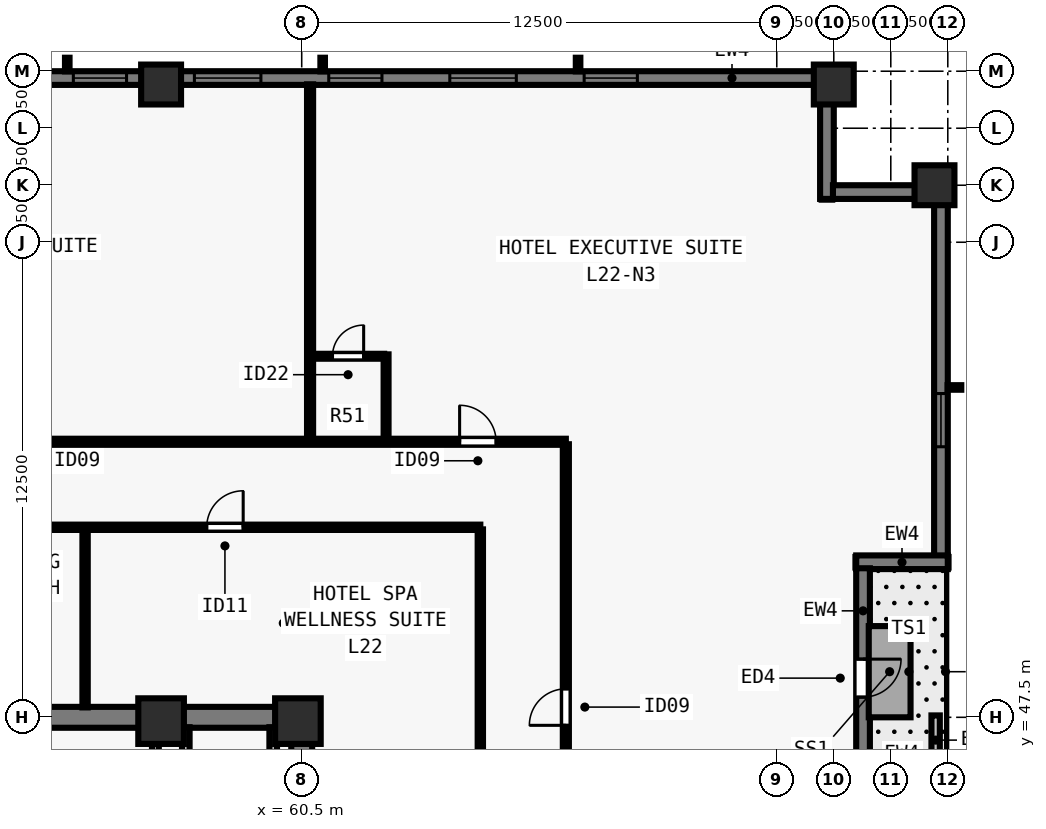
"""IFC4 building model, lengths in metres.
Left out: names, types, materials, properties, quantities, classifications, styles, units other than length and angle.
Written with IfcOpenShell. Run it as: python <this file> out.ifc"""

import sys

from ifc_helpers import new_model, si_unit, direction, frame, frame_2d, origin, origin_2d, place, context, subcontext, project, spatial, rectangle, extrude, element, fill, save


model = new_model("IFC4")
c1 = context("Model", 3, precision=1e-05, world=origin(), true_north=direction((0.0, 1.0)))
c2 = subcontext(c1, "Body", "Model", "MODEL_VIEW")
j1 = project(units=[si_unit("LENGTHUNIT", "METRE"), si_unit("PLANEANGLEUNIT", "RADIAN")], contexts=[c1])
p1 = place(None, origin())
s1 = spatial("IfcSite", under=j1, at=p1, CompositionType="ELEMENT")
p2 = place(p1, origin())
s2 = spatial("IfcBuilding", under=s1, at=p2, CompositionType="ELEMENT")
p3 = place(p2, frame((0.0, 0.0, 83.0)))
s3 = spatial("IfcBuildingStorey", under=s2, at=p3, CompositionType="ELEMENT", Elevation=83.0)
for number, where, z_axis, x_axis in (
    (1, (56.8, 47.4, 0.0), (0.0, 0.0, 1.0), (1.0, 0.0, 0.0)),
    (2, (60.4, 47.4, 0.0), (0.0, 0.0, 1.0), (1.0, 0.0, 0.0)),
):
    element("IfcColumn", number, at=place(p3, frame(where, z_axis=z_axis, x_axis=x_axis)), inside=s3, PredefinedType="COLUMN", context=c2, shape_type="SweptSolid", body=[
        extrude(rectangle(XDim=1.2, YDim=1.2, at=origin_2d()), origin(), (0.0, 0.0, 1.0), 3.5),
    ])
for number, where, z_axis, x_axis in (
    (3, (77.15, 61.5, 0.0), (0.0, 0.0, 1.0), (0.0, 1.0, 0.0)),
    (4, (74.5, 64.15, 0.0), (0.0, 0.0, 1.0), (1.0, 0.0, 0.0)),
    (5, (56.8, 64.15, 0.0), (0.0, 0.0, 1.0), (1.0, 0.0, 0.0)),
):
    element("IfcColumn", number, at=place(p3, frame(where, z_axis=z_axis, x_axis=x_axis)), inside=s3, PredefinedType="COLUMN", context=c2, shape_type="SweptSolid", body=[
        extrude(rectangle(XDim=1.05, YDim=1.05, at=origin_2d()), origin(), (0.0, 0.0, 1.0), 3.5),
    ])
p4 = place(p3, frame((29.5, 64.32, 0.0), z_axis=(0.0, 0.0, 1.0), x_axis=(1.0, 0.0, 0.0)))
e6 = element("IfcWall", 6, at=p4, inside=s3, PredefinedType="SOLIDWALL", context=c2, shape_type="SweptSolid", body=[
    extrude(rectangle(XDim=44.662, YDim=0.36, at=frame_2d((22.331, 0.0))), origin(), (0.0, 0.0, 1.0), 3.28),
])
p5 = place(p4, frame((4.83, 0.0, 0.8)))
e7 = element("IfcOpeningElement", 7, at=p5, cuts=e6, PredefinedType="OPENING", context=c2, shape_type="SweptSolid", body=[
    extrude(rectangle(XDim=1.4, YDim=1.544, at=frame_2d((0.7, 0.772))), frame((0.0, 0.19, 0.0), z_axis=(0.0, -1.0, 0.0), x_axis=(1.0, 0.0, 0.0)), (0.0, 0.0, 1.0), 0.38),
])
p6 = place(p4, frame((8.015, 0.0, 0.8)))
e8 = element("IfcOpeningElement", 8, at=p6, cuts=e6, PredefinedType="OPENING", context=c2, shape_type="SweptSolid", body=[
    extrude(rectangle(XDim=1.75, YDim=1.544, at=frame_2d((0.875, 0.772))), frame((0.0, 0.19, 0.0), z_axis=(0.0, -1.0, 0.0), x_axis=(1.0, 0.0, 0.0)), (0.0, 0.0, 1.0), 0.38),
])
p7 = place(p4, frame((11.551, 0.0, 0.8)))
e9 = element("IfcOpeningElement", 9, at=p7, cuts=e6, PredefinedType="OPENING", context=c2, shape_type="SweptSolid", body=[
    extrude(rectangle(XDim=1.4, YDim=1.544, at=frame_2d((0.7, 0.772))), frame((0.0, 0.19, 0.0), z_axis=(0.0, -1.0, 0.0), x_axis=(1.0, 0.0, 0.0)), (0.0, 0.0, 1.0), 0.38),
])
p8 = place(p4, frame((14.736, 0.0, 0.8)))
e10 = element("IfcOpeningElement", 10, at=p8, cuts=e6, PredefinedType="OPENING", context=c2, shape_type="SweptSolid", body=[
    extrude(rectangle(XDim=1.75, YDim=1.544, at=frame_2d((0.875, 0.772))), frame((0.0, 0.19, 0.0), z_axis=(0.0, -1.0, 0.0), x_axis=(1.0, 0.0, 0.0)), (0.0, 0.0, 1.0), 0.38),
])
p9 = place(p4, frame((18.721, 0.0, 0.8)))
e11 = element("IfcOpeningElement", 11, at=p9, cuts=e6, PredefinedType="OPENING", context=c2, shape_type="SweptSolid", body=[
    extrude(rectangle(XDim=1.4, YDim=1.544, at=frame_2d((0.7, 0.772))), frame((0.0, 0.19, 0.0), z_axis=(0.0, -1.0, 0.0), x_axis=(1.0, 0.0, 0.0)), (0.0, 0.0, 1.0), 0.38),
])
p10 = place(p4, frame((21.456, 0.0, 0.8)))
e12 = element("IfcOpeningElement", 12, at=p10, cuts=e6, PredefinedType="OPENING", context=c2, shape_type="SweptSolid", body=[
    extrude(rectangle(XDim=1.75, YDim=1.544, at=frame_2d((0.875, 0.772))), frame((0.0, 0.19, 0.0), z_axis=(0.0, -1.0, 0.0), x_axis=(1.0, 0.0, 0.0)), (0.0, 0.0, 1.0), 0.38),
])
p11 = place(p4, frame((24.991, 0.0, 0.8)))
e13 = element("IfcOpeningElement", 13, at=p11, cuts=e6, PredefinedType="OPENING", context=c2, shape_type="SweptSolid", body=[
    extrude(rectangle(XDim=1.4, YDim=1.544, at=frame_2d((0.7, 0.772))), frame((0.0, 0.19, 0.0), z_axis=(0.0, -1.0, 0.0), x_axis=(1.0, 0.0, 0.0)), (0.0, 0.0, 1.0), 0.38),
])
p12 = place(p4, frame((28.177, 0.0, 0.8)))
e14 = element("IfcOpeningElement", 14, at=p12, cuts=e6, PredefinedType="OPENING", context=c2, shape_type="SweptSolid", body=[
    extrude(rectangle(XDim=1.75, YDim=1.544, at=frame_2d((0.875, 0.772))), frame((0.0, 0.19, 0.0), z_axis=(0.0, -1.0, 0.0), x_axis=(1.0, 0.0, 0.0)), (0.0, 0.0, 1.0), 0.38),
])
p13 = place(p4, frame((31.711, 0.0, 0.8)))
e15 = element("IfcOpeningElement", 15, at=p13, cuts=e6, PredefinedType="OPENING", context=c2, shape_type="SweptSolid", body=[
    extrude(rectangle(XDim=1.4, YDim=1.544, at=frame_2d((0.7, 0.772))), frame((0.0, 0.19, 0.0), z_axis=(0.0, -1.0, 0.0), x_axis=(1.0, 0.0, 0.0)), (0.0, 0.0, 1.0), 0.38),
])
p14 = place(p4, frame((34.897, 0.0, 0.8)))
e16 = element("IfcOpeningElement", 16, at=p14, cuts=e6, PredefinedType="OPENING", context=c2, shape_type="SweptSolid", body=[
    extrude(rectangle(XDim=1.75, YDim=1.544, at=frame_2d((0.875, 0.772))), frame((0.0, 0.19, 0.0), z_axis=(0.0, -1.0, 0.0), x_axis=(1.0, 0.0, 0.0)), (0.0, 0.0, 1.0), 0.38),
])
p15 = place(p4, frame((38.432, 0.0, 0.8)))
e17 = element("IfcOpeningElement", 17, at=p15, cuts=e6, PredefinedType="OPENING", context=c2, shape_type="SweptSolid", body=[
    extrude(rectangle(XDim=1.4, YDim=1.544, at=frame_2d((0.7, 0.772))), frame((0.0, 0.19, 0.0), z_axis=(0.0, -1.0, 0.0), x_axis=(1.0, 0.0, 0.0)), (0.0, 0.0, 1.0), 0.38),
])
p16 = place(p3, frame((74.32, 64.5, 0.0), z_axis=(0.0, 0.0, 1.0), x_axis=(0.0, -1.0, 0.0)))
e18 = element("IfcWall", 18, at=p16, inside=s3, PredefinedType="SOLIDWALL", context=c2, shape_type="SweptSolid", body=[
    extrude(rectangle(XDim=3.36, YDim=0.36, at=frame_2d((1.68, 0.0))), origin(), (0.0, 0.0, 1.0), 3.28),
])
p17 = place(p3, frame((74.478, 61.32, 0.0), z_axis=(0.0, 0.0, 1.0), x_axis=(1.0, 0.0, 0.0)))
e19 = element("IfcWall", 19, at=p17, inside=s3, PredefinedType="SOLIDWALL", context=c2, shape_type="SweptSolid", body=[
    extrude(rectangle(XDim=2.684, YDim=0.36, at=frame_2d((1.342, 0.0))), origin(), (0.0, 0.0, 1.0), 3.28),
])
p18 = place(p3, frame((77.32, 61.5, 0.0), z_axis=(0.0, 0.0, 1.0), x_axis=(0.0, -1.0, 0.0)))
e20 = element("IfcWall", 20, at=p18, inside=s3, PredefinedType="SOLIDWALL", context=c2, shape_type="SweptSolid", body=[
    extrude(rectangle(XDim=9.762, YDim=0.36, at=frame_2d((4.881, 0.0))), origin(), (0.0, 0.0, 1.0), 3.28),
])
p19 = place(p18, frame((5.481, 0.0, 0.8)))
e21 = element("IfcOpeningElement", 21, at=p19, cuts=e20, PredefinedType="OPENING", context=c2, shape_type="SweptSolid", body=[
    extrude(rectangle(XDim=1.4, YDim=1.544, at=frame_2d((0.7, 0.772))), frame((0.0, 0.19, 0.0), z_axis=(0.0, -1.0, 0.0), x_axis=(1.0, 0.0, 0.0)), (0.0, 0.0, 1.0), 0.38),
])
p20 = place(p3, frame((77.5, 51.58, 0.0), z_axis=(0.0, 0.0, 1.0), x_axis=(-1.0, 0.0, 0.0)))
e22 = element("IfcWall", 22, at=p20, inside=s3, PredefinedType="SOLIDWALL", context=c2, shape_type="SweptSolid", body=[
    extrude(rectangle(XDim=2.41, YDim=0.36, at=frame_2d((1.205, 0.0))), origin(), (0.0, 0.0, 1.0), 3.28),
])
p21 = place(p3, frame((75.27, 51.422, 0.0), z_axis=(0.0, 0.0, 1.0), x_axis=(0.0, -1.0, 0.0)))
e23 = element("IfcWall", 23, at=p21, inside=s3, PredefinedType="SOLIDWALL", context=c2, shape_type="SweptSolid", body=[
    extrude(rectangle(XDim=5.782, YDim=0.36, at=frame_2d((2.891, 0.0))), origin(), (0.0, 0.0, 1.0), 3.28),
])
p22 = place(p21, frame((2.391, 0.0, 0.0)))
e24 = element("IfcOpeningElement", 24, at=p22, cuts=e23, PredefinedType="OPENING", context=c2, shape_type="SweptSolid", body=[
    extrude(rectangle(XDim=1.0, YDim=2.15, at=frame_2d((0.5, 1.075))), frame((0.0, 0.19, 0.0), z_axis=(0.0, -1.0, 0.0), x_axis=(1.0, 0.0, 0.0)), (0.0, 0.0, 1.0), 0.38),
])
p23 = place(p3, frame((77.18, 46.25, 0.0), z_axis=(0.0, 0.0, 1.0), x_axis=(0.0, 1.0, 0.0)))
e25 = element("IfcWall", 25, at=p23, inside=s3, PredefinedType="PARAPET", context=c2, shape_type="SweptSolid", body=[
    extrude(rectangle(XDim=1.3, YDim=0.22, at=frame_2d((0.65, 0.0))), origin(), (0.0, 0.0, 1.0), 0.55),
])
p24 = place(p3, frame((43.225, 47.5, 0.0), z_axis=(0.0, 0.0, 1.0), x_axis=(1.0, 0.0, 0.0)))
e26 = element("IfcWall", 26, at=p24, inside=s3, PredefinedType="SHEAR", context=c2, shape_type="SweptSolid", body=[
    extrude(rectangle(XDim=17.55, YDim=0.55, at=frame_2d((8.775, 0.0))), origin(), (0.0, 0.0, 1.0), 3.28),
])
p25 = place(p3, frame((60.5, 40.8, 0.0), z_axis=(0.0, 0.0, 1.0), x_axis=(0.0, 1.0, 0.0)))
e27 = element("IfcWall", 27, at=p25, inside=s3, PredefinedType="SHEAR", context=c2, shape_type="SweptSolid", body=[
    extrude(rectangle(XDim=6.435, YDim=0.55, at=frame_2d((3.218, 0.0))), origin(), (0.0, 0.0, 1.0), 3.28),
])
for number, where, z_axis, x_axis in (
    (28, (57.45, 43.735, 0.0), (0.0, 0.0, 1.0), (0.0, 1.0, 0.0)),
    (29, (59.75, 43.735, 0.0), (0.0, 0.0, 1.0), (0.0, 1.0, 0.0)),
):
    element("IfcWall", number, at=place(p3, frame(where, z_axis=z_axis, x_axis=x_axis)), inside=s3, PredefinedType="SOLIDWALL", context=c2, shape_type="SweptSolid", body=[
        extrude(rectangle(XDim=3.505, YDim=0.2, at=frame_2d((1.752, 0.0))), origin(), (0.0, 0.0, 1.0), 3.28),
    ])
p26 = place(p3, frame((56.65, 43.735, 0.0), z_axis=(0.0, 0.0, 1.0), x_axis=(0.0, 1.0, 0.0)))
e30 = element("IfcWall", 30, at=p26, inside=s3, PredefinedType="SOLIDWALL", context=c2, shape_type="SweptSolid", body=[
    extrude(rectangle(XDim=3.505, YDim=0.18, at=frame_2d((1.752, 0.0))), origin(), (0.0, 0.0, 1.0), 3.28),
])
p27 = place(p3, frame((36.55, 54.75, 0.0), z_axis=(0.0, 0.0, 1.0), x_axis=(1.0, 0.0, 0.0)))
e31 = element("IfcWall", 31, at=p27, inside=s3, PredefinedType="PARTITIONING", context=c2, shape_type="SweptSolid", body=[
    extrude(rectangle(XDim=30.9, YDim=0.16, at=frame_2d((15.45, 0.0))), origin(), (0.0, 0.0, 1.0), 3.28),
])
p28 = place(p27, frame((2.83, 0.0, 0.0)))
e32 = element("IfcOpeningElement", 32, at=p28, cuts=e31, PredefinedType="OPENING", context=c2, shape_type="SweptSolid", body=[
    extrude(rectangle(XDim=0.96, YDim=2.15, at=frame_2d((0.48, 1.075))), frame((0.0, 0.09, 0.0), z_axis=(0.0, -1.0, 0.0), x_axis=(1.0, 0.0, 0.0)), (0.0, 0.0, 1.0), 0.18),
])
p29 = place(p27, frame((15.965, 0.0, 0.0)))
e33 = element("IfcOpeningElement", 33, at=p29, cuts=e31, PredefinedType="OPENING", context=c2, shape_type="SweptSolid", body=[
    extrude(rectangle(XDim=0.96, YDim=2.15, at=frame_2d((0.48, 1.075))), frame((0.0, 0.09, 0.0), z_axis=(0.0, -1.0, 0.0), x_axis=(1.0, 0.0, 0.0)), (0.0, 0.0, 1.0), 0.18),
])
p30 = place(p27, frame((28.105, 0.0, 0.0)))
e34 = element("IfcOpeningElement", 34, at=p30, cuts=e31, PredefinedType="OPENING", context=c2, shape_type="SweptSolid", body=[
    extrude(rectangle(XDim=0.96, YDim=2.15, at=frame_2d((0.48, 1.075))), frame((0.0, 0.09, 0.0), z_axis=(0.0, -1.0, 0.0), x_axis=(1.0, 0.0, 0.0)), (0.0, 0.0, 1.0), 0.18),
])
p31 = place(p3, frame((67.45, 23.315, 0.0), z_axis=(0.0, 0.0, 1.0), x_axis=(0.0, 1.0, 0.0)))
e35 = element("IfcWall", 35, at=p31, inside=s3, PredefinedType="PARTITIONING", context=c2, shape_type="SweptSolid", body=[
    extrude(rectangle(XDim=31.37, YDim=0.16, at=frame_2d((15.685, 0.0))), origin(), (0.0, 0.0, 1.0), 3.28),
])
p32 = place(p31, frame((8.474, 0.0, 0.0)))
e36 = element("IfcOpeningElement", 36, at=p32, cuts=e35, PredefinedType="OPENING", context=c2, shape_type="SweptSolid", body=[
    extrude(rectangle(XDim=0.96, YDim=2.15, at=frame_2d((0.48, 1.075))), frame((0.0, 0.09, 0.0), z_axis=(0.0, -1.0, 0.0), x_axis=(1.0, 0.0, 0.0)), (0.0, 0.0, 1.0), 0.18),
])
p33 = place(p31, frame((23.974, 0.0, 0.0)))
e37 = element("IfcOpeningElement", 37, at=p33, cuts=e35, PredefinedType="OPENING", context=c2, shape_type="SweptSolid", body=[
    extrude(rectangle(XDim=0.96, YDim=2.15, at=frame_2d((0.48, 1.075))), frame((0.0, 0.09, 0.0), z_axis=(0.0, -1.0, 0.0), x_axis=(1.0, 0.0, 0.0)), (0.0, 0.0, 1.0), 0.18),
])
p34 = place(p3, frame((38.8, 52.5, 0.0), z_axis=(0.0, 0.0, 1.0), x_axis=(1.0, 0.0, 0.0)))
e38 = element("IfcWall", 38, at=p34, inside=s3, PredefinedType="PARTITIONING", context=c2, shape_type="SweptSolid", body=[
    extrude(rectangle(XDim=26.4, YDim=0.14, at=frame_2d((13.2, 0.0))), origin(), (0.0, 0.0, 1.0), 3.28),
])
p35 = place(p34, frame((3.2, 0.0, 0.0)))
e39 = element("IfcOpeningElement", 39, at=p35, cuts=e38, PredefinedType="OPENING", context=c2, shape_type="SweptSolid", body=[
    extrude(rectangle(XDim=0.96, YDim=2.12, at=frame_2d((0.48, 1.06))), frame((0.0, 0.08, 0.0), z_axis=(0.0, -1.0, 0.0), x_axis=(1.0, 0.0, 0.0)), (0.0, 0.0, 1.0), 0.16),
])
p36 = place(p34, frame((19.2, 0.0, 0.0)))
e40 = element("IfcOpeningElement", 40, at=p36, cuts=e38, PredefinedType="OPENING", context=c2, shape_type="SweptSolid", body=[
    extrude(rectangle(XDim=0.96, YDim=2.12, at=frame_2d((0.48, 1.06))), frame((0.0, 0.08, 0.0), z_axis=(0.0, -1.0, 0.0), x_axis=(1.0, 0.0, 0.0)), (0.0, 0.0, 1.0), 0.16),
])
p37 = place(p3, frame((65.2, 40.8, 0.0), z_axis=(0.0, 0.0, 1.0), x_axis=(0.0, 1.0, 0.0)))
e41 = element("IfcWall", 41, at=p37, inside=s3, PredefinedType="PARTITIONING", context=c2, shape_type="SweptSolid", body=[
    extrude(rectangle(XDim=11.645, YDim=0.14, at=frame_2d((5.823, 0.0))), origin(), (0.0, 0.0, 1.0), 3.28),
])
p38 = place(p37, frame((2.5, 0.0, 0.0)))
e42 = element("IfcOpeningElement", 42, at=p38, cuts=e41, PredefinedType="OPENING", context=c2, shape_type="SweptSolid", body=[
    extrude(rectangle(XDim=0.88, YDim=2.1, at=frame_2d((0.44, 1.05))), frame((0.0, 0.08, 0.0), z_axis=(0.0, -1.0, 0.0), x_axis=(1.0, 0.0, 0.0)), (0.0, 0.0, 1.0), 0.16),
])
p39 = place(p3, frame((54.8, 47.76, 0.0), z_axis=(0.0, 0.0, 1.0), x_axis=(0.0, 1.0, 0.0)))
e43 = element("IfcWall", 43, at=p39, inside=s3, PredefinedType="PARTITIONING", context=c2, shape_type="SweptSolid", body=[
    extrude(rectangle(XDim=4.685, YDim=0.14, at=frame_2d((2.343, 0.0))), origin(), (0.0, 0.0, 1.0), 3.28),
])
p40 = place(p3, frame((60.72, 54.815, 0.0), z_axis=(0.0, 0.0, 1.0), x_axis=(0.0, 1.0, 0.0)))
e44 = element("IfcWall", 44, at=p40, inside=s3, PredefinedType="PARTITIONING", context=c2, shape_type="SweptSolid", body=[
    extrude(rectangle(XDim=9.34, YDim=0.16, at=frame_2d((4.67, 0.0))), origin(), (0.0, 0.0, 1.0), 3.28),
])
p41 = place(p3, frame((62.72, 54.815, 0.0), z_axis=(0.0, 0.0, 1.0), x_axis=(0.0, 1.0, 0.0)))
e45 = element("IfcWall", 45, at=p41, inside=s3, PredefinedType="PLUMBINGWALL", context=c2, shape_type="SweptSolid", body=[
    extrude(rectangle(XDim=2.235, YDim=0.13, at=frame_2d((1.118, 0.0))), origin(), (0.0, 0.0, 1.0), 3.28),
])
p42 = place(p3, frame((60.785, 57.0, 0.0), z_axis=(0.0, 0.0, 1.0), x_axis=(1.0, 0.0, 0.0)))
e46 = element("IfcWall", 46, at=p42, inside=s3, PredefinedType="PLUMBINGWALL", context=c2, shape_type="SweptSolid", body=[
    extrude(rectangle(XDim=1.885, YDim=0.13, at=frame_2d((0.942, 0.0))), origin(), (0.0, 0.0, 1.0), 3.28),
])
p43 = place(p42, frame((0.525, 0.0, 0.0)))
e47 = element("IfcOpeningElement", 47, at=p43, cuts=e46, PredefinedType="OPENING", context=c2, shape_type="SweptSolid", body=[
    extrude(rectangle(XDim=0.82, YDim=2.1, at=frame_2d((0.41, 1.05))), frame((0.0, 0.075, 0.0), z_axis=(0.0, -1.0, 0.0), x_axis=(1.0, 0.0, 0.0)), (0.0, 0.0, 1.0), 0.15),
])
p44 = place(p11, origin())
e48 = element("IfcWindow", 48, at=p44, inside=s3, PartitioningType="SINGLE_PANEL", PredefinedType="WINDOW", context=c2, shape_type="SweptSolid", body=[
    extrude(rectangle(XDim=1.4, YDim=1.544, at=frame_2d((0.7, 0.772))), frame((0.0, -0.05, 0.0), z_axis=(0.0, -1.0, 0.0), x_axis=(1.0, 0.0, 0.0)), (0.0, 0.0, 1.0), 0.06),
])
fill(e13, e48)
p45 = place(p12, origin())
e49 = element("IfcWindow", 49, at=p45, inside=s3, PartitioningType="SINGLE_PANEL", PredefinedType="WINDOW", context=c2, shape_type="SweptSolid", body=[
    extrude(rectangle(XDim=1.75, YDim=1.544, at=frame_2d((0.875, 0.772))), frame((0.0, -0.05, 0.0), z_axis=(0.0, -1.0, 0.0), x_axis=(1.0, 0.0, 0.0)), (0.0, 0.0, 1.0), 0.06),
])
fill(e14, e49)
p46 = place(p13, origin())
e50 = element("IfcWindow", 50, at=p46, inside=s3, PartitioningType="SINGLE_PANEL", PredefinedType="WINDOW", context=c2, shape_type="SweptSolid", body=[
    extrude(rectangle(XDim=1.4, YDim=1.544, at=frame_2d((0.7, 0.772))), frame((0.0, -0.05, 0.0), z_axis=(0.0, -1.0, 0.0), x_axis=(1.0, 0.0, 0.0)), (0.0, 0.0, 1.0), 0.06),
])
fill(e15, e50)
p47 = place(p14, origin())
e51 = element("IfcWindow", 51, at=p47, inside=s3, PartitioningType="SINGLE_PANEL", PredefinedType="WINDOW", context=c2, shape_type="SweptSolid", body=[
    extrude(rectangle(XDim=1.75, YDim=1.544, at=frame_2d((0.875, 0.772))), frame((0.0, -0.05, 0.0), z_axis=(0.0, -1.0, 0.0), x_axis=(1.0, 0.0, 0.0)), (0.0, 0.0, 1.0), 0.06),
])
fill(e16, e51)
p48 = place(p15, origin())
e52 = element("IfcWindow", 52, at=p48, inside=s3, PartitioningType="SINGLE_PANEL", PredefinedType="WINDOW", context=c2, shape_type="SweptSolid", body=[
    extrude(rectangle(XDim=1.4, YDim=1.544, at=frame_2d((0.7, 0.772))), frame((0.0, -0.05, 0.0), z_axis=(0.0, -1.0, 0.0), x_axis=(1.0, 0.0, 0.0)), (0.0, 0.0, 1.0), 0.06),
])
fill(e17, e52)
p49 = place(p19, origin())
e53 = element("IfcWindow", 53, at=p49, inside=s3, PartitioningType="SINGLE_PANEL", PredefinedType="WINDOW", context=c2, shape_type="SweptSolid", body=[
    extrude(rectangle(XDim=1.4, YDim=1.544, at=frame_2d((0.7, 0.772))), frame((0.0, -0.05, 0.0), z_axis=(0.0, -1.0, 0.0), x_axis=(1.0, 0.0, 0.0)), (0.0, 0.0, 1.0), 0.06),
])
fill(e21, e53)
p50 = place(p22, origin())
e54 = element("IfcDoor", 54, at=p50, inside=s3, OperationType="SINGLE_SWING_LEFT", PredefinedType="DOOR", context=c2, shape_type="SweptSolid", body=[
    extrude(rectangle(XDim=1.0, YDim=2.15, at=frame_2d((0.5, 1.075))), frame((0.0, 0.025, 0.0), z_axis=(0.0, -1.0, 0.0), x_axis=(1.0, 0.0, 0.0)), (0.0, 0.0, 1.0), 0.05),
])
fill(e24, e54)
p51 = place(p36, origin())
e55 = element("IfcDoor", 55, at=p51, inside=s3, OperationType="SINGLE_SWING_RIGHT", PredefinedType="DOOR", context=c2, shape_type="SweptSolid", body=[
    extrude(rectangle(XDim=0.96, YDim=2.12, at=frame_2d((0.48, 1.06))), frame((0.0, 0.025, 0.0), z_axis=(0.0, -1.0, 0.0), x_axis=(1.0, 0.0, 0.0)), (0.0, 0.0, 1.0), 0.05),
])
fill(e40, e55)
p52 = place(p43, origin())
e56 = element("IfcDoor", 56, at=p52, inside=s3, OperationType="SINGLE_SWING_RIGHT", PredefinedType="DOOR", context=c2, shape_type="SweptSolid", body=[
    extrude(rectangle(XDim=0.82, YDim=2.1, at=frame_2d((0.41, 1.05))), frame((0.0, 0.025, 0.0), z_axis=(0.0, -1.0, 0.0), x_axis=(1.0, 0.0, 0.0)), (0.0, 0.0, 1.0), 0.05),
])
fill(e47, e56)
p53 = place(p30, origin())
e57 = element("IfcDoor", 57, at=p53, inside=s3, OperationType="SINGLE_SWING_LEFT", PredefinedType="DOOR", context=c2, shape_type="SweptSolid", body=[
    extrude(rectangle(XDim=0.96, YDim=2.15, at=frame_2d((0.48, 1.075))), frame((0.0, 0.025, 0.0), z_axis=(0.0, -1.0, 0.0), x_axis=(1.0, 0.0, 0.0)), (0.0, 0.0, 1.0), 0.05),
])
fill(e34, e57)
p54 = place(p33, origin())
e58 = element("IfcDoor", 58, at=p54, inside=s3, OperationType="SINGLE_SWING_LEFT", PredefinedType="DOOR", context=c2, shape_type="SweptSolid", body=[
    extrude(rectangle(XDim=0.96, YDim=2.15, at=frame_2d((0.48, 1.075))), frame((0.0, 0.025, 0.0), z_axis=(0.0, -1.0, 0.0), x_axis=(1.0, 0.0, 0.0)), (0.0, 0.0, 1.0), 0.05),
])
fill(e37, e58)
save(model, sys.argv[1])
